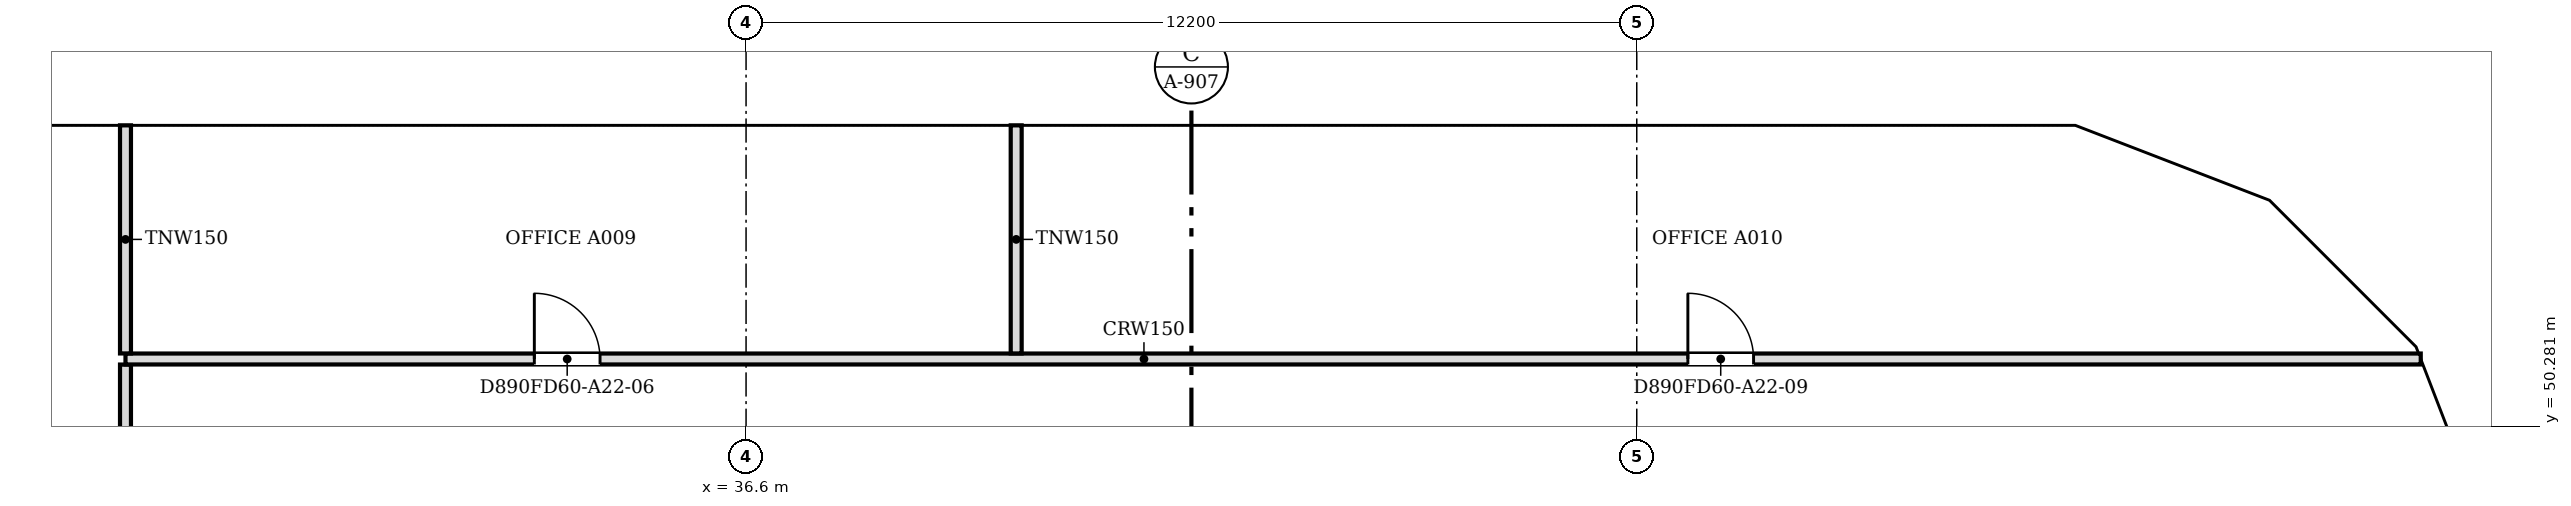
"""IFC4 building model, lengths in metres.
Left out: names, types, materials, properties, quantities, classifications, styles, units other than length and angle.
Written with IfcOpenShell. Run it as: python <this file> out.ifc"""

import sys

from ifc_helpers import new_model, si_unit, direction, frame, frame_2d, origin, place, context, subcontext, project, spatial, polyline, rectangle, outline, extrude, faceted_brep, source, transform, mapped, element, fill, save


model = new_model("IFC4")
c1 = context("Model", 3, precision=1e-05, world=origin(), true_north=direction((0.0, 1.0)))
c2 = subcontext(c1, "Body", "Model", "MODEL_VIEW")
j1 = project(units=[si_unit("LENGTHUNIT", "METRE"), si_unit("PLANEANGLEUNIT", "RADIAN")], contexts=[c1])
p1 = place(None, origin())
s1 = spatial("IfcSite", under=j1, at=p1, CompositionType="ELEMENT")
p2 = place(p1, origin())
s2 = spatial("IfcBuilding", under=s1, at=p2, CompositionType="ELEMENT")
p3 = place(p2, frame((0.0, 0.0, 252.1)))
s3 = spatial("IfcBuildingStorey", under=s2, at=p3, CompositionType="ELEMENT", Elevation=252.1)
m1 = source(origin(), c2, "Body", "Brep", [
    faceted_brep([(2.95, -0.25, 0.0), (3.003, -0.25, 0.068), (3.003, -0.25, 7.531), (2.95, -0.25, 7.6), (0.0, -0.25, 3.8), (0.047, 0.25, 3.86), (2.898, 0.25, 7.532), (2.898, 0.25, 0.068), (0.047, 0.25, 3.74), (2.95, 0.0, 0.0), (2.95, 0.0, 7.6), (0.0, 0.0, 3.8)], [[[0, 1, 2, 3, 4]], [[5, 6, 7, 8]], [[1, 0, 9]], [[10, 3, 2]], [[6, 5, 11, 4, 3, 10]], [[8, 7, 9, 0, 4, 11]], [[8, 11, 5]], [[1, 9, 7, 6, 10, 2]]]),
])
p4 = place(p3, frame((60.75, 48.753, -3.8), z_axis=(0.0, 0.0, 1.0), x_axis=(-0.35992665181, 0.932980602862, 0.0)))
e1 = element("IfcWall", 1, at=p4, inside=s3, PredefinedType="SOLIDWALL", context=c2, shape_type="MappedRepresentation", body=[
    mapped(m1, transform((0.0, 0.0, 0.0), scale=1.0)),
])
m2 = source(origin(), c2, "Body", "SweptSolid", [
    extrude(outline(polyline([(2.75, 6.935), (0.316, 3.8), (2.75, 0.665), (2.75, 6.935)])), frame((0.0, 0.26, 0.0), z_axis=(0.0, -1.0, 0.0), x_axis=(1.0, 0.0, 0.0)), (0.0, 0.0, 1.0), 0.52),
])
p5 = place(p4, origin())
e2 = element("IfcOpeningElement", 2, at=p5, cuts=e1, PredefinedType="OPENING", context=c2, shape_type="MappedRepresentation", body=[
    mapped(m2, transform((0.0, 0.0, 0.0), scale=1.0)),
])
m3 = source(origin(), c2, "Body", "Brep", [
    faceted_brep([(0.053, -0.25, 0.0), (2.997, -0.25, 3.8), (0.053, -0.25, 7.6), (0.0, -0.25, 7.532), (0.0, -0.25, 0.068), (0.106, 0.25, 7.531), (2.944, 0.25, 3.868), (2.944, 0.25, 3.732), (0.106, 0.25, 0.068), (2.997, 0.0, 3.8), (0.053, 0.0, 0.0), (0.053, 0.0, 7.6)], [[[0, 1, 2, 3, 4]], [[5, 6, 7, 8]], [[8, 7, 9, 1, 0, 10]], [[6, 5, 11, 2, 1, 9]], [[3, 2, 11]], [[10, 0, 4]], [[8, 10, 4, 3, 11, 5]], [[7, 6, 9]]]),
])
p6 = place(p3, frame((59.726, 51.469, -3.8), z_axis=(0.0, 0.0, 1.0), x_axis=(-0.707106781187, 0.707106781187, 0.0)))
e3 = element("IfcWall", 3, at=p6, inside=s3, PredefinedType="SOLIDWALL", context=c2, shape_type="MappedRepresentation", body=[
    mapped(m3, transform((0.0, 0.0, 0.0), scale=1.0)),
])
m4 = source(origin(), c2, "Body", "SweptSolid", [
    extrude(outline(polyline([(0.253, 0.666), (2.681, 3.8), (0.253, 6.934), (0.253, 0.666)])), frame((0.0, 0.26, 0.0), z_axis=(0.0, -1.0, 0.0), x_axis=(1.0, 0.0, 0.0)), (0.0, 0.0, 1.0), 0.52),
])
p7 = place(p6, origin())
e4 = element("IfcOpeningElement", 4, at=p7, cuts=e3, PredefinedType="OPENING", context=c2, shape_type="MappedRepresentation", body=[
    mapped(m4, transform((0.0, 0.0, 0.0), scale=1.0)),
])
m5 = source(origin(), c2, "Body", "Brep", [
    faceted_brep([(2.95, -0.25, 0.0), (2.997, -0.25, 0.059), (2.997, -0.25, 7.541), (2.95, -0.25, 7.6), (0.0, -0.25, 3.8), (0.053, 0.25, 3.868), (2.904, 0.25, 7.54), (2.904, 0.25, 0.06), (0.053, 0.25, 3.732), (2.95, 0.0, 0.0), (2.95, 0.0, 7.6), (0.0, 0.0, 3.8)], [[[0, 1, 2, 3, 4]], [[5, 6, 7, 8]], [[1, 0, 9]], [[10, 3, 2]], [[6, 5, 11, 4, 3, 10]], [[8, 7, 9, 0, 4, 11]], [[8, 11, 5]], [[1, 9, 7, 6, 10, 2]]]),
])
p8 = place(p3, frame((57.606, 53.588, -3.8), z_axis=(0.0, 0.0, 1.0), x_axis=(-0.932990326376, 0.359901446078, 0.0)))
e5 = element("IfcWall", 5, at=p8, inside=s3, PredefinedType="SOLIDWALL", context=c2, shape_type="MappedRepresentation", body=[
    mapped(m5, transform((0.0, 0.0, 0.0), scale=1.0)),
])
p9 = place(p8, origin())
e6 = element("IfcOpeningElement", 6, at=p9, cuts=e5, PredefinedType="OPENING", context=c2, shape_type="MappedRepresentation", body=[
    mapped(m2, transform((0.0, 0.0, 0.0), scale=1.0)),
])
m6 = source(origin(), c2, "Body", "Brep", [
    faceted_brep([(0.047, -0.25, 0.0), (3.05, -0.25, 3.8), (0.047, -0.25, 7.6), (0.0, -0.25, 7.54), (0.0, -0.25, 0.06), (0.093, 0.25, 7.541), (3.05, 0.25, 3.8), (0.093, 0.25, 0.059), (0.047, 0.0, 0.0), (0.047, 0.0, 7.6)], [[[0, 1, 2, 3, 4]], [[5, 6, 7]], [[7, 6, 1, 0, 8]], [[6, 5, 9, 2, 1]], [[3, 2, 9]], [[8, 0, 4]], [[7, 8, 4, 3, 9, 5]]]),
])
p10 = place(p3, frame((54.9, 54.65, -3.8), z_axis=(0.0, 0.0, 1.0), x_axis=(-1.0, 0.0, 0.0)))
e7 = element("IfcWall", 7, at=p10, inside=s3, PredefinedType="SOLIDWALL", context=c2, shape_type="MappedRepresentation", body=[
    mapped(m6, transform((0.0, 0.0, 0.0), scale=1.0)),
])
m7 = source(origin(), c2, "Body", "SweptSolid", [
    extrude(outline(polyline([(0.247, 0.656), (2.731, 3.8), (0.247, 6.944), (0.247, 0.656)])), frame((0.0, 0.26, 0.0), z_axis=(0.0, -1.0, 0.0), x_axis=(1.0, 0.0, 0.0)), (0.0, 0.0, 1.0), 0.52),
])
p11 = place(p10, origin())
e8 = element("IfcOpeningElement", 8, at=p11, cuts=e7, PredefinedType="OPENING", context=c2, shape_type="MappedRepresentation", body=[
    mapped(m7, transform((0.0, 0.0, 0.0), scale=1.0)),
])
m8 = source(origin(), c2, "Body", "SweptSolid", [
    extrude(outline(polyline([(3.05, 0.0), (6.1, 3.8), (3.05, 7.6), (0.0, 3.8), (3.05, 0.0)])), frame((0.0, 0.25, 0.0), z_axis=(0.0, -1.0, 0.0), x_axis=(1.0, 0.0, 0.0)), (0.0, 0.0, 1.0), 0.5),
])
p12 = place(p3, frame((51.85, 54.65, -3.8), z_axis=(0.0, 0.0, 1.0), x_axis=(-1.0, 0.0, 0.0)))
e9 = element("IfcWall", 9, at=p12, inside=s3, PredefinedType="SOLIDWALL", context=c2, shape_type="MappedRepresentation", body=[
    mapped(m8, transform((0.0, 0.0, 0.0), scale=1.0)),
])
m9 = source(origin(), c2, "Body", "SweptSolid", [
    extrude(outline(polyline([(3.05, 0.399), (5.78, 3.8), (3.05, 7.2), (0.321, 3.8), (3.05, 0.399)])), frame((0.0, 0.26, 0.0), z_axis=(0.0, -1.0, 0.0), x_axis=(1.0, 0.0, 0.0)), (0.0, 0.0, 1.0), 0.52),
])
p13 = place(p12, origin())
e10 = element("IfcOpeningElement", 10, at=p13, cuts=e9, PredefinedType="OPENING", context=c2, shape_type="MappedRepresentation", body=[
    mapped(m9, transform((0.0, 0.0, 0.0), scale=1.0)),
])
p14 = place(p3, frame((45.75, 54.65, -3.8), z_axis=(0.0, 0.0, 1.0), x_axis=(-1.0, 0.0, 0.0)))
e11 = element("IfcWall", 11, at=p14, inside=s3, PredefinedType="SOLIDWALL", context=c2, shape_type="MappedRepresentation", body=[
    mapped(m8, transform((0.0, 0.0, 0.0), scale=1.0)),
])
p15 = place(p14, origin())
e12 = element("IfcOpeningElement", 12, at=p15, cuts=e11, PredefinedType="OPENING", context=c2, shape_type="MappedRepresentation", body=[
    mapped(m9, transform((0.0, 0.0, 0.0), scale=1.0)),
])
m10 = source(origin(), c2, "Body", "Brep", [
    faceted_brep([(3.05, -0.25, 0.0), (6.1, -0.25, 3.8), (6.1, -0.25, 3.8), (3.05, -0.25, 7.6), (0.0, -0.25, 3.8), (0.0, 0.25, 3.8), (3.05, 0.25, 7.6), (6.1, 0.25, 3.8), (6.1, 0.25, 3.8), (3.05, 0.25, 0.0)], [[[0, 1, 2, 3, 4]], [[5, 6, 7, 8, 9]], [[9, 8, 1, 0]], [[7, 6, 3, 2]], [[6, 5, 4, 3]], [[5, 9, 0, 4]], [[1, 8, 7, 2]]]),
])
p16 = place(p3, frame((39.65, 54.65, -3.8), z_axis=(0.0, 0.0, 1.0), x_axis=(-1.0, 0.0, 0.0)))
e13 = element("IfcWall", 13, at=p16, inside=s3, PredefinedType="SOLIDWALL", context=c2, shape_type="MappedRepresentation", body=[
    mapped(m10, transform((0.0, 0.0, 0.0), scale=1.0)),
])
p17 = place(p16, origin())
e14 = element("IfcOpeningElement", 14, at=p17, cuts=e13, PredefinedType="OPENING", context=c2, shape_type="MappedRepresentation", body=[
    mapped(m9, transform((0.0, 0.0, 0.0), scale=1.0)),
])
p18 = place(p3, frame((33.55, 54.65, -3.8), z_axis=(0.0, 0.0, 1.0), x_axis=(-1.0, 0.0, 0.0)))
e15 = element("IfcWall", 15, at=p18, inside=s3, PredefinedType="SOLIDWALL", context=c2, shape_type="MappedRepresentation", body=[
    mapped(m8, transform((0.0, 0.0, 0.0), scale=1.0)),
])
p19 = place(p18, origin())
e16 = element("IfcOpeningElement", 16, at=p19, cuts=e15, PredefinedType="OPENING", context=c2, shape_type="MappedRepresentation", body=[
    mapped(m9, transform((0.0, 0.0, 0.0), scale=1.0)),
])
p20 = place(p3, frame((27.45, 54.65, -3.8), z_axis=(0.0, 0.0, 1.0), x_axis=(-1.0, 0.0, 0.0)))
e17 = element("IfcWall", 17, at=p20, inside=s3, PredefinedType="SOLIDWALL", context=c2, shape_type="MappedRepresentation", body=[
    mapped(m10, transform((0.0, 0.0, 0.0), scale=1.0)),
])
p21 = place(p20, origin())
e18 = element("IfcOpeningElement", 18, at=p21, cuts=e17, PredefinedType="OPENING", context=c2, shape_type="MappedRepresentation", body=[
    mapped(m9, transform((0.0, 0.0, 0.0), scale=1.0)),
])
p22 = place(p2, frame((0.0, 0.0, 255.9)))
s4 = spatial("IfcBuildingStorey", under=s2, at=p22, CompositionType="ELEMENT", Elevation=255.9)
m11 = source(origin(), c2, "Body", "Brep", [
    faceted_brep([(0.047, -0.25, 0.0), (2.997, -0.25, 3.8), (0.047, -0.25, 7.6), (0.0, -0.25, 7.541), (0.0, -0.25, 0.059), (0.093, 0.25, 7.54), (2.944, 0.25, 3.868), (2.944, 0.25, 3.732), (0.093, 0.25, 0.06), (2.997, 0.0, 3.8), (0.047, 0.0, 0.0), (0.047, 0.0, 7.6)], [[[0, 1, 2, 3, 4]], [[5, 6, 7, 8]], [[8, 7, 9, 1, 0, 10]], [[6, 5, 11, 2, 1, 9]], [[3, 2, 11]], [[10, 0, 4]], [[8, 10, 4, 3, 11, 5]], [[9, 7, 6]]]),
])
p23 = place(p22, frame((60.767, 48.71, -3.8), z_axis=(0.0, 0.0, 1.0), x_axis=(-0.359901446078, 0.932990326376, 0.0)))
e19 = element("IfcWall", 19, at=p23, inside=s4, PredefinedType="SOLIDWALL", context=c2, shape_type="MappedRepresentation", body=[
    mapped(m11, transform((0.0, 0.0, 0.0), scale=1.0)),
])
m12 = source(origin(), c2, "Body", "SweptSolid", [
    extrude(outline(polyline([(0.247, 0.665), (2.681, 3.8), (0.247, 6.935), (0.247, 0.665)])), frame((0.0, 0.26, 0.0), z_axis=(0.0, -1.0, 0.0), x_axis=(1.0, 0.0, 0.0)), (0.0, 0.0, 1.0), 0.52),
])
p24 = place(p23, origin())
e20 = element("IfcOpeningElement", 20, at=p24, cuts=e19, PredefinedType="OPENING", context=c2, shape_type="MappedRepresentation", body=[
    mapped(m12, transform((0.0, 0.0, 0.0), scale=1.0)),
])
m13 = source(origin(), c2, "Body", "Brep", [
    faceted_brep([(2.944, -0.25, 0.0), (2.997, -0.25, 0.068), (2.997, -0.25, 7.532), (2.944, -0.25, 7.6), (0.0, -0.25, 3.8), (0.053, 0.25, 3.868), (2.891, 0.25, 7.532), (2.891, 0.25, 0.068), (0.053, 0.25, 3.731), (2.944, 0.0, 0.0), (2.944, 0.0, 7.6), (0.0, 0.0, 3.8)], [[[0, 1, 2, 3, 4]], [[5, 6, 7, 8]], [[1, 0, 9]], [[10, 3, 2]], [[6, 5, 11, 4, 3, 10]], [[8, 7, 9, 0, 4, 11]], [[8, 11, 5]], [[1, 9, 7, 6, 10, 2]]]),
])
p25 = place(p22, frame((59.688, 51.506, -3.8), z_axis=(0.0, 0.0, 1.0), x_axis=(-0.707106781187, 0.707106781187, 0.0)))
e21 = element("IfcWall", 21, at=p25, inside=s4, PredefinedType="SOLIDWALL", context=c2, shape_type="MappedRepresentation", body=[
    mapped(m13, transform((0.0, 0.0, 0.0), scale=1.0)),
])
m14 = source(origin(), c2, "Body", "SweptSolid", [
    extrude(outline(polyline([(2.744, 6.934), (0.316, 3.8), (2.744, 0.666), (2.744, 6.934)])), frame((0.0, 0.26, 0.0), z_axis=(0.0, -1.0, 0.0), x_axis=(1.0, 0.0, 0.0)), (0.0, 0.0, 1.0), 0.52),
])
p26 = place(p25, origin())
e22 = element("IfcOpeningElement", 22, at=p26, cuts=e21, PredefinedType="OPENING", context=c2, shape_type="MappedRepresentation", body=[
    mapped(m14, transform((0.0, 0.0, 0.0), scale=1.0)),
])
m15 = source(origin(), c2, "Body", "Brep", [
    faceted_brep([(0.053, -0.25, 0.0), (3.003, -0.25, 3.8), (0.053, -0.25, 7.6), (0.0, -0.25, 7.531), (0.0, -0.25, 0.068), (0.106, 0.25, 7.532), (2.957, 0.25, 3.86), (2.957, 0.25, 3.74), (0.106, 0.25, 0.068), (3.003, 0.0, 3.8), (0.053, 0.0, 0.0), (0.053, 0.0, 7.6)], [[[0, 1, 2, 3, 4]], [[5, 6, 7, 8]], [[8, 7, 9, 1, 0, 10]], [[6, 5, 11, 2, 1, 9]], [[3, 2, 11]], [[10, 0, 4]], [[8, 10, 4, 3, 11, 5]], [[9, 7, 6]]]),
])
p27 = place(p22, frame((57.656, 53.569, -3.8), z_axis=(0.0, 0.0, 1.0), x_axis=(-0.933007896601, 0.359855894603, 0.0)))
e23 = element("IfcWall", 23, at=p27, inside=s4, PredefinedType="SOLIDWALL", context=c2, shape_type="MappedRepresentation", body=[
    mapped(m15, transform((0.0, 0.0, 0.0), scale=1.0)),
])
m16 = source(origin(), c2, "Body", "SweptSolid", [
    extrude(outline(polyline([(0.253, 0.665), (2.687, 3.8), (0.253, 6.935), (0.253, 0.665)])), frame((0.0, 0.26, 0.0), z_axis=(0.0, -1.0, 0.0), x_axis=(1.0, 0.0, 0.0)), (0.0, 0.0, 1.0), 0.52),
])
p28 = place(p27, origin())
e24 = element("IfcOpeningElement", 24, at=p28, cuts=e23, PredefinedType="OPENING", context=c2, shape_type="MappedRepresentation", body=[
    mapped(m16, transform((0.0, 0.0, 0.0), scale=1.0)),
])
m17 = source(origin(), c2, "Body", "Brep", [
    faceted_brep([(3.003, -0.25, 0.0), (6.053, -0.25, 3.8), (3.003, -0.25, 7.6), (0.0, -0.25, 3.8), (0.047, 0.25, 3.859), (3.003, 0.25, 7.6), (6.053, 0.25, 3.8), (3.003, 0.25, 0.0), (0.047, 0.25, 3.741), (0.0, 0.0, 3.8)], [[[0, 1, 2, 3]], [[4, 5, 6, 7, 8]], [[7, 6, 1, 0]], [[6, 5, 2, 1]], [[5, 4, 9, 3, 2]], [[8, 7, 0, 3, 9]], [[8, 9, 4]]]),
])
p29 = place(p22, frame((54.854, 54.65, -3.8), z_axis=(0.0, 0.0, 1.0), x_axis=(-1.0, 0.0, 0.0)))
e25 = element("IfcWall", 25, at=p29, inside=s4, PredefinedType="SOLIDWALL", context=c2, shape_type="MappedRepresentation", body=[
    mapped(m17, transform((0.0, 0.0, 0.0), scale=1.0)),
])
m18 = source(origin(), c2, "Body", "SweptSolid", [
    extrude(outline(polyline([(3.005, 0.401), (5.733, 3.8), (3.005, 7.199), (0.319, 3.8), (3.005, 0.401)])), frame((0.0, 0.26, 0.0), z_axis=(0.0, -1.0, 0.0), x_axis=(1.0, 0.0, 0.0)), (0.0, 0.0, 1.0), 0.52),
])
p30 = place(p29, origin())
e26 = element("IfcOpeningElement", 26, at=p30, cuts=e25, PredefinedType="OPENING", context=c2, shape_type="MappedRepresentation", body=[
    mapped(m18, transform((0.0, 0.0, 0.0), scale=1.0)),
])
m19 = source(origin(), c2, "Body", "SweptSolid", [
    extrude(outline(polyline([(3.05, 0.0), (6.1, 3.8), (3.05, 7.6), (0.0, 3.8), (3.05, 0.0)])), frame((0.0, 0.25, 0.0), z_axis=(0.0, -1.0, 0.0), x_axis=(1.0, 0.0, 0.0)), (0.0, 0.0, 1.0), 0.5),
])
p31 = place(p22, frame((48.8, 54.65, -3.8), z_axis=(0.0, 0.0, 1.0), x_axis=(-1.0, 0.0, 0.0)))
e27 = element("IfcWall", 27, at=p31, inside=s4, PredefinedType="SOLIDWALL", context=c2, shape_type="MappedRepresentation", body=[
    mapped(m19, transform((0.0, 0.0, 0.0), scale=1.0)),
])
m20 = source(origin(), c2, "Body", "SweptSolid", [
    extrude(outline(polyline([(3.05, 0.399), (5.78, 3.8), (3.05, 7.2), (0.321, 3.8), (3.05, 0.399)])), frame((0.0, 0.26, 0.0), z_axis=(0.0, -1.0, 0.0), x_axis=(1.0, 0.0, 0.0)), (0.0, 0.0, 1.0), 0.52),
])
p32 = place(p31, origin())
e28 = element("IfcOpeningElement", 28, at=p32, cuts=e27, PredefinedType="OPENING", context=c2, shape_type="MappedRepresentation", body=[
    mapped(m20, transform((0.0, 0.0, 0.0), scale=1.0)),
])
m21 = source(origin(), c2, "Body", "Brep", [
    faceted_brep([(3.05, -0.25, 0.0), (6.1, -0.25, 3.8), (6.1, -0.25, 3.8), (3.05, -0.25, 7.6), (0.0, -0.25, 3.8), (0.0, 0.25, 3.8), (3.05, 0.25, 7.6), (6.1, 0.25, 3.8), (6.1, 0.25, 3.8), (3.05, 0.25, 0.0)], [[[0, 1, 2, 3, 4]], [[5, 6, 7, 8, 9]], [[9, 8, 1, 0]], [[7, 6, 3, 2]], [[6, 5, 4, 3]], [[5, 9, 0, 4]], [[1, 8, 7, 2]]]),
])
p33 = place(p22, frame((42.7, 54.65, -3.8), z_axis=(0.0, 0.0, 1.0), x_axis=(-1.0, 0.0, 0.0)))
e29 = element("IfcWall", 29, at=p33, inside=s4, PredefinedType="SOLIDWALL", context=c2, shape_type="MappedRepresentation", body=[
    mapped(m21, transform((0.0, 0.0, 0.0), scale=1.0)),
])
p34 = place(p33, origin())
e30 = element("IfcOpeningElement", 30, at=p34, cuts=e29, PredefinedType="OPENING", context=c2, shape_type="MappedRepresentation", body=[
    mapped(m20, transform((0.0, 0.0, 0.0), scale=1.0)),
])
p35 = place(p22, frame((36.6, 54.65, -3.8), z_axis=(0.0, 0.0, 1.0), x_axis=(-1.0, 0.0, 0.0)))
e31 = element("IfcWall", 31, at=p35, inside=s4, PredefinedType="SOLIDWALL", context=c2, shape_type="MappedRepresentation", body=[
    mapped(m19, transform((0.0, 0.0, 0.0), scale=1.0)),
])
p36 = place(p35, origin())
e32 = element("IfcOpeningElement", 32, at=p36, cuts=e31, PredefinedType="OPENING", context=c2, shape_type="MappedRepresentation", body=[
    mapped(m20, transform((0.0, 0.0, 0.0), scale=1.0)),
])
p37 = place(p22, frame((30.5, 54.65, -3.8), z_axis=(0.0, 0.0, 1.0), x_axis=(-1.0, 0.0, 0.0)))
e33 = element("IfcWall", 33, at=p37, inside=s4, PredefinedType="SOLIDWALL", context=c2, shape_type="MappedRepresentation", body=[
    mapped(m19, transform((0.0, 0.0, 0.0), scale=1.0)),
])
p38 = place(p37, origin())
e34 = element("IfcOpeningElement", 34, at=p38, cuts=e33, PredefinedType="OPENING", context=c2, shape_type="MappedRepresentation", body=[
    mapped(m20, transform((0.0, 0.0, 0.0), scale=1.0)),
])
p39 = place(p3, frame((28.1, 48.176, 0.0), z_axis=(0.0, 0.0, 1.0), x_axis=(0.0, 1.0, 0.0)))
e35 = element("IfcWall", 35, at=p39, inside=s3, PredefinedType="PARTITIONING", context=c2, shape_type="SweptSolid", body=[
    extrude(rectangle(XDim=2.948, YDim=0.15, at=frame_2d((1.474, 0.0))), origin(), (0.0, 0.0, 1.0), 3.067),
])
p40 = place(p3, frame((28.1, 51.2, 0.0), z_axis=(0.0, 0.0, 1.0), x_axis=(1.0, 0.0, 0.0)))
e36 = element("IfcWall", 36, at=p40, inside=s3, PredefinedType="PARTITIONING", context=c2, shape_type="SweptSolid", body=[
    extrude(rectangle(XDim=31.438, YDim=0.15, at=frame_2d((15.719, 0.0))), origin(), (0.0, 0.0, 1.0), 3.067),
])
m22 = source(origin(), c2, "Body", "SweptSolid", [
    extrude(rectangle(XDim=0.9, YDim=2.1, at=frame_2d((0.45, 1.05))), frame((0.0, 0.085, 0.0), z_axis=(0.0, -1.0, 0.0), x_axis=(1.0, 0.0, 0.0)), (0.0, 0.0, 1.0), 0.17),
])
p41 = place(p40, frame((5.6, 0.0, 0.0)))
e37 = element("IfcOpeningElement", 37, at=p41, cuts=e36, PredefinedType="OPENING", context=c2, shape_type="MappedRepresentation", body=[
    mapped(m22, transform((0.0, 0.0, 0.0), scale=1.0)),
])
p42 = place(p40, frame((21.4, 0.0, 0.0)))
e38 = element("IfcOpeningElement", 38, at=p42, cuts=e36, PredefinedType="OPENING", context=c2, shape_type="MappedRepresentation", body=[
    mapped(m22, transform((0.0, 0.0, 0.0), scale=1.0)),
])
for number, where, z_axis, x_axis in (
    (39, (28.1, 51.276, 0.0), (0.0, 0.0, 1.0), (0.0, 1.0, 0.0)),
    (40, (40.3, 51.276, 0.0), (0.0, 0.0, 1.0), (0.0, 1.0, 0.0)),
):
    element("IfcWall", number, at=place(p3, frame(where, z_axis=z_axis, x_axis=x_axis)), inside=s3, PredefinedType="PARTITIONING", context=c2, shape_type="SweptSolid", body=[
        extrude(rectangle(XDim=3.124, YDim=0.15, at=frame_2d((1.562, 0.0))), origin(), (0.0, 0.0, 1.0), 3.067),
    ])
m23 = source(origin(), c2, "Body", "SweptSolid", [
    extrude(rectangle(XDim=0.9, YDim=2.1, at=frame_2d((0.45, 1.05))), frame((0.0, 0.025, 0.0), z_axis=(0.0, -1.0, 0.0), x_axis=(1.0, 0.0, 0.0)), (0.0, 0.0, 1.0), 0.05),
])
p43 = place(p41, origin())
e41 = element("IfcDoor", 41, at=p43, inside=s3, OperationType="SINGLE_SWING_LEFT", PredefinedType="DOOR", context=c2, shape_type="MappedRepresentation", body=[
    mapped(m23, transform((0.0, 0.0, 0.0), scale=1.0)),
])
fill(e37, e41)
p44 = place(p42, origin())
e42 = element("IfcDoor", 42, at=p44, inside=s3, OperationType="SINGLE_SWING_LEFT", PredefinedType="DOOR", context=c2, shape_type="MappedRepresentation", body=[
    mapped(m23, transform((0.0, 0.0, 0.0), scale=1.0)),
])
fill(e38, e42)
save(model, sys.argv[1])
